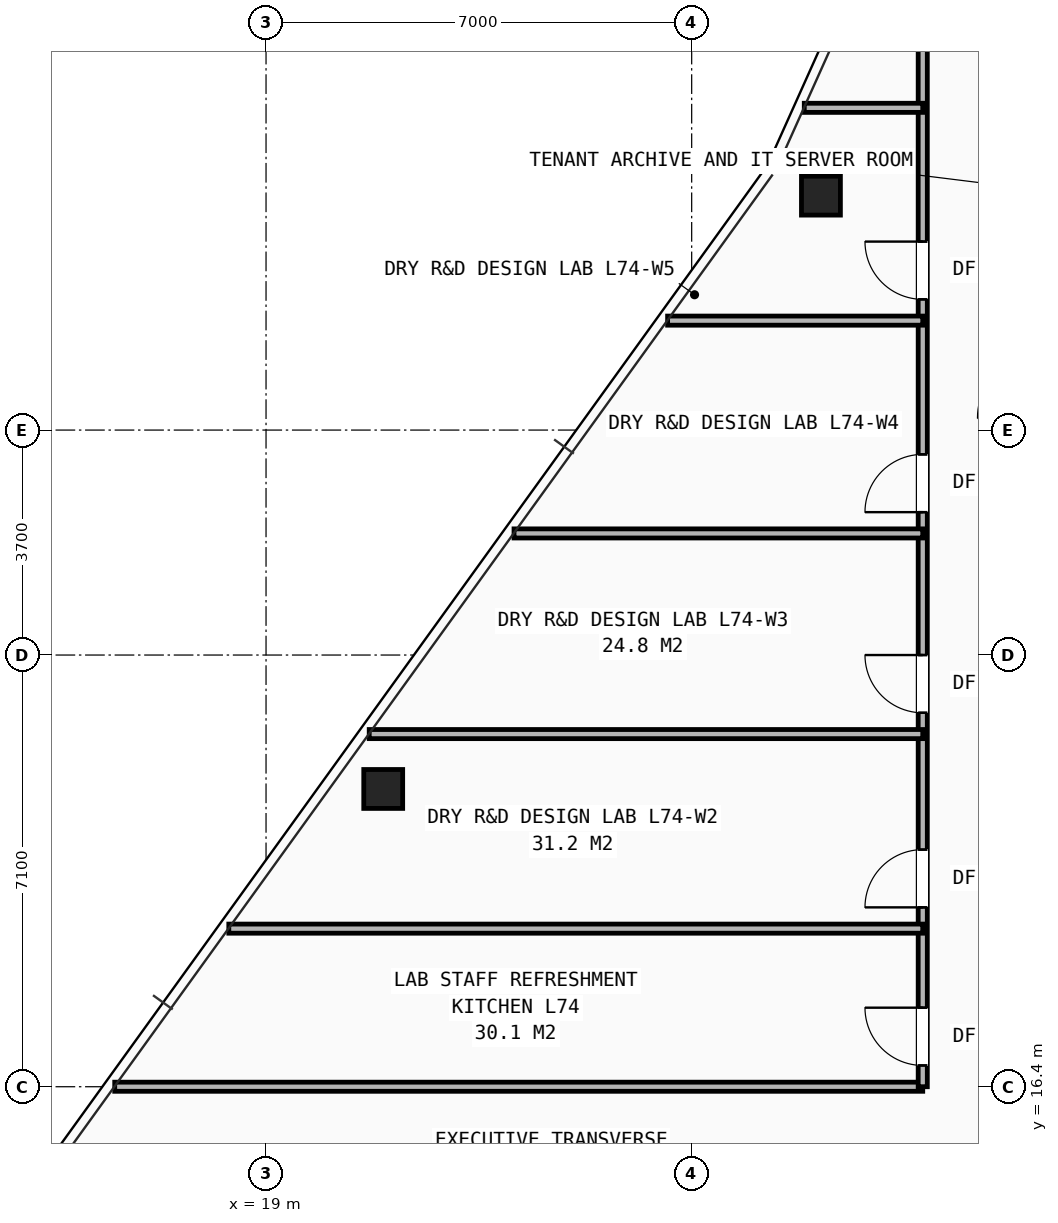
"""IFC4 building model, lengths in metres.
Left out: names, types, materials, properties, quantities, classifications, styles, units other than length and angle.
Written with IfcOpenShell. Run it as: python <this file> out.ifc"""

import sys

from ifc_helpers import new_model, si_unit, direction, frame, frame_2d, origin, origin_2d, place, context, subcontext, project, spatial, rectangle, hollow_rectangle, extrude, element, fill, save


model = new_model("IFC4")
c1 = context("Model", 3, precision=1e-05, world=origin(), true_north=direction((0.0, 1.0)))
c2 = subcontext(c1, "Body", "Model", "MODEL_VIEW")
j1 = project(units=[si_unit("LENGTHUNIT", "METRE"), si_unit("PLANEANGLEUNIT", "RADIAN")], contexts=[c1])
p1 = place(None, origin())
s1 = spatial("IfcSite", under=j1, at=p1, CompositionType="ELEMENT")
p2 = place(p1, origin())
s2 = spatial("IfcBuilding", under=s1, at=p2, CompositionType="ELEMENT")
p3 = place(p2, frame((0.0, 0.0, 262.0)))
s3 = spatial("IfcBuildingStorey", under=s2, at=p3, CompositionType="ELEMENT", Elevation=262.0)
for number, where, z_axis, x_axis in (
    (1, (28.126, 31.056, 0.0), (0.0, 0.0, 1.0), (1.0, 0.0, 0.0)),
    (2, (20.927, 21.297, 0.0), (0.0, 0.0, 1.0), (1.0, 0.0, 0.0)),
):
    element("IfcColumn", number, at=place(p3, frame(where, z_axis=z_axis, x_axis=x_axis)), inside=s3, PredefinedType="COLUMN", context=c2, shape_type="SweptSolid", body=[
        extrude(hollow_rectangle(XDim=0.64, YDim=0.64, WallThickness=0.045, at=origin_2d()), origin(), (0.0, 0.0, 1.0), 3.5),
    ])
p4 = place(p3, frame((16.511, 16.4, 0.0), z_axis=(0.0, 0.0, 1.0), x_axis=(1.0, 0.0, 0.0)))
e3 = element("IfcWall", 3, at=p4, inside=s3, PredefinedType="PARTITIONING", context=c2, shape_type="SweptSolid", body=[
    extrude(rectangle(XDim=13.289, YDim=0.15, at=frame_2d((6.644, 0.0))), origin(), (0.0, 0.0, 1.0), 2.265),
])
p5 = place(p3, frame((29.8, 16.4, 0.0), z_axis=(0.0, 0.0, 1.0), x_axis=(0.0, 1.0, 0.0)))
e4 = element("IfcWall", 4, at=p5, inside=s3, PredefinedType="PARTITIONING", context=c2, shape_type="SweptSolid", body=[
    extrude(rectangle(XDim=19.3, YDim=0.15, at=frame_2d((9.65, 0.0))), origin(), (0.0, 0.0, 1.0), 2.265),
])
p6 = place(p5, frame((0.35, 0.0, 0.0)))
e5 = element("IfcOpeningElement", 5, at=p6, cuts=e4, PredefinedType="OPENING", context=c2, shape_type="SweptSolid", body=[
    extrude(rectangle(XDim=0.95, YDim=2.1, at=frame_2d((0.475, 1.05))), frame((0.0, 0.085, 0.0), z_axis=(0.0, -1.0, 0.0), x_axis=(1.0, 0.0, 0.0)), (0.0, 0.0, 1.0), 0.17),
])
p7 = place(p5, frame((2.95, 0.0, 0.0)))
e6 = element("IfcOpeningElement", 6, at=p7, cuts=e4, PredefinedType="OPENING", context=c2, shape_type="SweptSolid", body=[
    extrude(rectangle(XDim=0.95, YDim=2.1, at=frame_2d((0.475, 1.05))), frame((0.0, 0.085, 0.0), z_axis=(0.0, -1.0, 0.0), x_axis=(1.0, 0.0, 0.0)), (0.0, 0.0, 1.0), 0.17),
])
p8 = place(p5, frame((6.15, 0.0, 0.0)))
e7 = element("IfcOpeningElement", 7, at=p8, cuts=e4, PredefinedType="OPENING", context=c2, shape_type="SweptSolid", body=[
    extrude(rectangle(XDim=0.95, YDim=2.1, at=frame_2d((0.475, 1.05))), frame((0.0, 0.085, 0.0), z_axis=(0.0, -1.0, 0.0), x_axis=(1.0, 0.0, 0.0)), (0.0, 0.0, 1.0), 0.17),
])
p9 = place(p5, frame((9.45, 0.0, 0.0)))
e8 = element("IfcOpeningElement", 8, at=p9, cuts=e4, PredefinedType="OPENING", context=c2, shape_type="SweptSolid", body=[
    extrude(rectangle(XDim=0.95, YDim=2.1, at=frame_2d((0.475, 1.05))), frame((0.0, 0.085, 0.0), z_axis=(0.0, -1.0, 0.0), x_axis=(1.0, 0.0, 0.0)), (0.0, 0.0, 1.0), 0.17),
])
p10 = place(p5, frame((12.95, 0.0, 0.0)))
e9 = element("IfcOpeningElement", 9, at=p10, cuts=e4, PredefinedType="OPENING", context=c2, shape_type="SweptSolid", body=[
    extrude(rectangle(XDim=0.95, YDim=2.1, at=frame_2d((0.475, 1.05))), frame((0.0, 0.085, 0.0), z_axis=(0.0, -1.0, 0.0), x_axis=(1.0, 0.0, 0.0)), (0.0, 0.0, 1.0), 0.17),
])
p11 = place(p3, frame((18.388, 19.0, 0.0), z_axis=(0.0, 0.0, 1.0), x_axis=(1.0, 0.0, 0.0)))
e10 = element("IfcWall", 10, at=p11, inside=s3, PredefinedType="PARTITIONING", context=c2, shape_type="SweptSolid", body=[
    extrude(rectangle(XDim=11.412, YDim=0.15, at=frame_2d((5.706, 0.0))), origin(), (0.0, 0.0, 1.0), 2.265),
])
p12 = place(p3, frame((20.697, 22.2, 0.0), z_axis=(0.0, 0.0, 1.0), x_axis=(1.0, 0.0, 0.0)))
e11 = element("IfcWall", 11, at=p12, inside=s3, PredefinedType="PARTITIONING", context=c2, shape_type="SweptSolid", body=[
    extrude(rectangle(XDim=9.103, YDim=0.15, at=frame_2d((4.552, 0.0))), origin(), (0.0, 0.0, 1.0), 2.628),
])
p13 = place(p3, frame((23.078, 25.5, 0.0), z_axis=(0.0, 0.0, 1.0), x_axis=(1.0, 0.0, 0.0)))
e12 = element("IfcWall", 12, at=p13, inside=s3, PredefinedType="PARTITIONING", context=c2, shape_type="SweptSolid", body=[
    extrude(rectangle(XDim=6.722, YDim=0.15, at=frame_2d((3.361, 0.0))), origin(), (0.0, 0.0, 1.0), 2.628),
])
p14 = place(p3, frame((25.604, 29.0, 0.0), z_axis=(0.0, 0.0, 1.0), x_axis=(1.0, 0.0, 0.0)))
e13 = element("IfcWall", 13, at=p14, inside=s3, PredefinedType="PARTITIONING", context=c2, shape_type="SweptSolid", body=[
    extrude(rectangle(XDim=4.196, YDim=0.15, at=frame_2d((2.098, 0.0))), origin(), (0.0, 0.0, 1.0), 2.628),
])
p15 = place(p3, frame((27.852, 32.5, 0.0), z_axis=(0.0, 0.0, 1.0), x_axis=(1.0, 0.0, 0.0)))
e14 = element("IfcWall", 14, at=p15, inside=s3, PredefinedType="PARTITIONING", context=c2, shape_type="SweptSolid", body=[
    extrude(rectangle(XDim=1.948, YDim=0.15, at=frame_2d((0.974, 0.0))), origin(), (0.0, 0.0, 1.0), 2.628),
])
p16 = place(p6, origin())
e15 = element("IfcDoor", 15, at=p16, inside=s3, OperationType="SINGLE_SWING_RIGHT", PredefinedType="DOOR", context=c2, shape_type="SweptSolid", body=[
    extrude(rectangle(XDim=0.95, YDim=2.1, at=frame_2d((0.475, 1.05))), frame((0.0, 0.025, 0.0), z_axis=(0.0, -1.0, 0.0), x_axis=(1.0, 0.0, 0.0)), (0.0, 0.0, 1.0), 0.05),
])
fill(e5, e15)
p17 = place(p7, origin())
e16 = element("IfcDoor", 16, at=p17, inside=s3, OperationType="SINGLE_SWING_LEFT", PredefinedType="DOOR", context=c2, shape_type="SweptSolid", body=[
    extrude(rectangle(XDim=0.95, YDim=2.1, at=frame_2d((0.475, 1.05))), frame((0.0, 0.025, 0.0), z_axis=(0.0, -1.0, 0.0), x_axis=(1.0, 0.0, 0.0)), (0.0, 0.0, 1.0), 0.05),
])
fill(e6, e16)
p18 = place(p8, origin())
e17 = element("IfcDoor", 17, at=p18, inside=s3, OperationType="SINGLE_SWING_RIGHT", PredefinedType="DOOR", context=c2, shape_type="SweptSolid", body=[
    extrude(rectangle(XDim=0.95, YDim=2.1, at=frame_2d((0.475, 1.05))), frame((0.0, 0.025, 0.0), z_axis=(0.0, -1.0, 0.0), x_axis=(1.0, 0.0, 0.0)), (0.0, 0.0, 1.0), 0.05),
])
fill(e7, e17)
p19 = place(p9, origin())
e18 = element("IfcDoor", 18, at=p19, inside=s3, OperationType="SINGLE_SWING_LEFT", PredefinedType="DOOR", context=c2, shape_type="SweptSolid", body=[
    extrude(rectangle(XDim=0.95, YDim=2.1, at=frame_2d((0.475, 1.05))), frame((0.0, 0.025, 0.0), z_axis=(0.0, -1.0, 0.0), x_axis=(1.0, 0.0, 0.0)), (0.0, 0.0, 1.0), 0.05),
])
fill(e8, e18)
p20 = place(p10, origin())
e19 = element("IfcDoor", 19, at=p20, inside=s3, OperationType="SINGLE_SWING_RIGHT", PredefinedType="DOOR", context=c2, shape_type="SweptSolid", body=[
    extrude(rectangle(XDim=0.95, YDim=2.1, at=frame_2d((0.475, 1.05))), frame((0.0, 0.025, 0.0), z_axis=(0.0, -1.0, 0.0), x_axis=(1.0, 0.0, 0.0)), (0.0, 0.0, 1.0), 0.05),
])
fill(e9, e19)
save(model, sys.argv[1])
